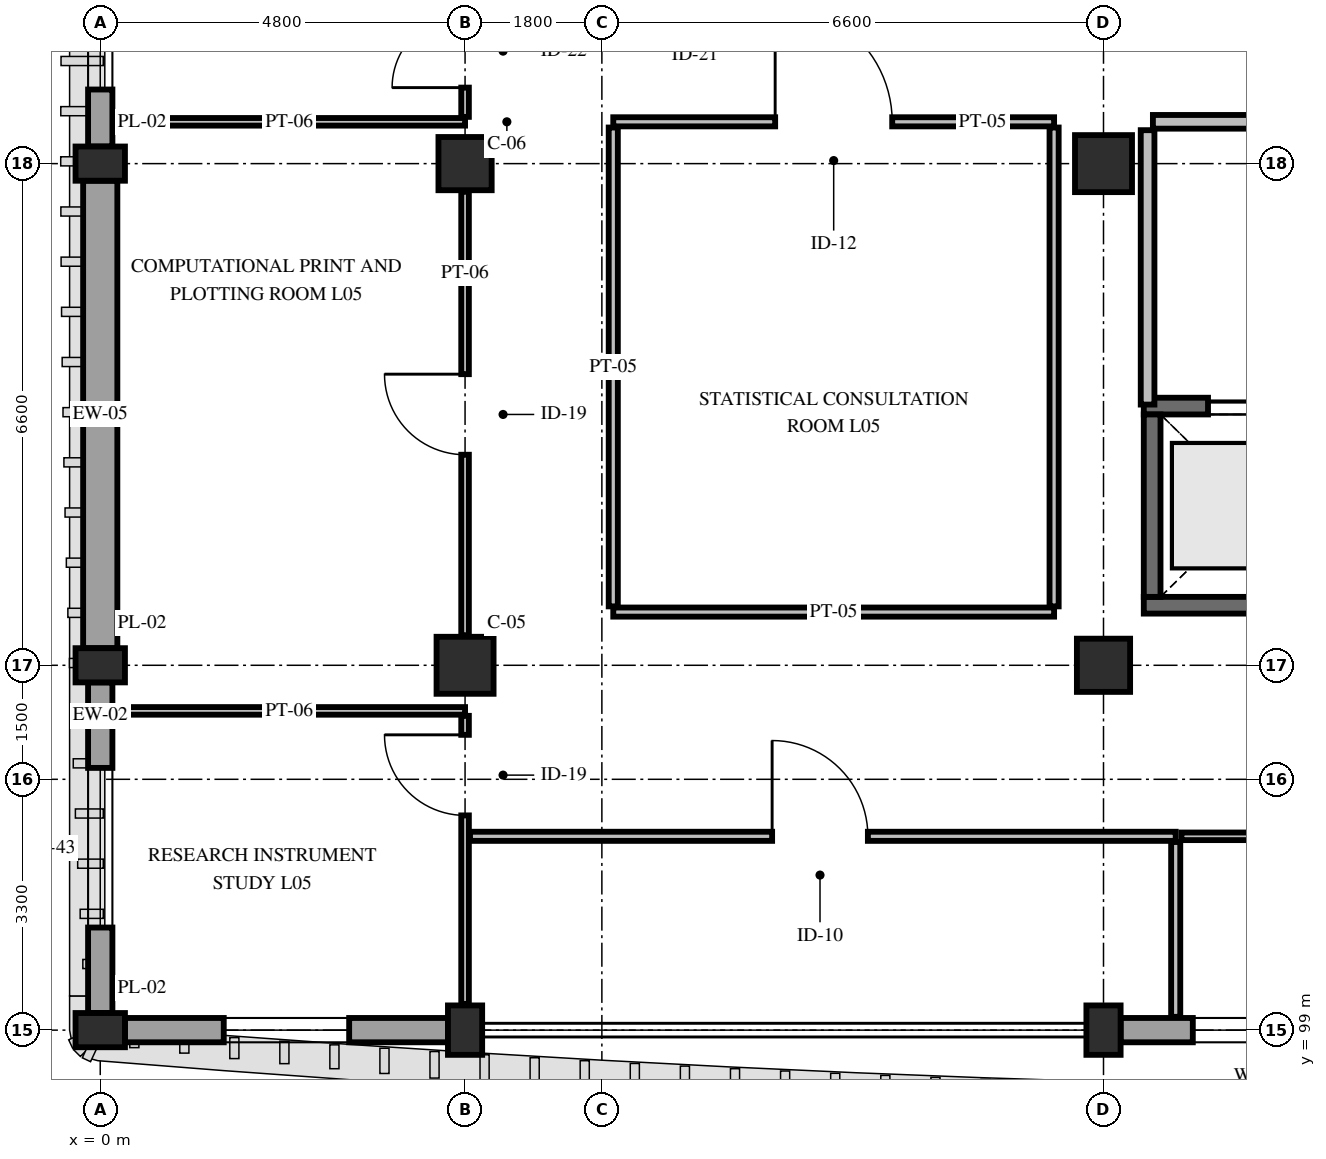
"""IFC4 building model, lengths in metres.
Left out: names, types, materials, properties, quantities, classifications, styles, units other than length and angle.
Written with IfcOpenShell. Run it as: python <this file> out.ifc"""

import sys

from ifc_helpers import new_model, si_unit, direction, frame, frame_2d, origin, origin_2d, place, context, subcontext, project, spatial, rectangle, extrude, element, fill, save


model = new_model("IFC4")
c1 = context("Model", 3, precision=1e-05, world=origin(), true_north=direction((0.0, 1.0)))
c2 = subcontext(c1, "Body", "Model", "MODEL_VIEW")
j1 = project(units=[si_unit("LENGTHUNIT", "METRE"), si_unit("PLANEANGLEUNIT", "RADIAN")], contexts=[c1])
p1 = place(None, origin())
s1 = spatial("IfcSite", under=j1, at=p1, CompositionType="ELEMENT")
p2 = place(p1, origin())
s2 = spatial("IfcBuilding", under=s1, at=p2, CompositionType="ELEMENT")
p3 = place(p2, frame((0.0, 0.0, 24.6)))
s3 = spatial("IfcBuildingStorey", under=s2, at=p3, CompositionType="ELEMENT", Elevation=24.6)
for number, where, z_axis, x_axis in (
    (1, (0.0, 99.0, 0.0), (0.0, 0.0, 1.0), (0.0, 1.0, 0.0)),
    (2, (0.0, 103.8, 0.0), (0.0, 0.0, 1.0), (0.0, 1.0, 0.0)),
    (3, (0.0, 110.4, 0.0), (0.0, 0.0, 1.0), (0.0, 1.0, 0.0)),
    (4, (4.8, 99.0, 0.0), (0.0, 0.0, 1.0), (1.0, 0.0, 0.0)),
):
    element("IfcColumn", number, at=place(p3, frame(where, z_axis=z_axis, x_axis=x_axis)), inside=s3, PredefinedType="PILASTER", context=c2, shape_type="SweptSolid", body=[
        extrude(rectangle(XDim=0.45, YDim=0.65, at=origin_2d()), origin(), (0.0, 0.0, 1.0), 4.8),
    ])
p4 = place(p3, frame((4.8, 103.8, 0.0), z_axis=(0.0, 0.0, 1.0), x_axis=(1.0, 0.0, 0.0)))
e5 = element("IfcColumn", 5, at=p4, inside=s3, PredefinedType="COLUMN", context=c2, shape_type="SweptSolid", body=[
    extrude(rectangle(XDim=0.75, YDim=0.75, at=origin_2d()), origin(), (0.0, 0.0, 1.0), 4.8),
])
p5 = place(p3, frame((4.8, 110.4, 0.0), z_axis=(0.0, 0.0, 1.0), x_axis=(1.0, 0.0, 0.0)))
e6 = element("IfcColumn", 6, at=p5, inside=s3, PredefinedType="COLUMN", context=c2, shape_type="SweptSolid", body=[
    extrude(rectangle(XDim=0.7, YDim=0.7, at=origin_2d()), origin(), (0.0, 0.0, 1.0), 4.8),
])
p6 = place(p3, frame((13.2, 99.0, 0.0), z_axis=(0.0, 0.0, 1.0), x_axis=(1.0, 0.0, 0.0)))
e7 = element("IfcColumn", 7, at=p6, inside=s3, PredefinedType="PILASTER", context=c2, shape_type="SweptSolid", body=[
    extrude(rectangle(XDim=0.45, YDim=0.65, at=origin_2d()), origin(), (0.0, 0.0, 1.0), 4.8),
])
p7 = place(p3, frame((13.2, 103.8, 0.0), z_axis=(0.0, 0.0, 1.0), x_axis=(1.0, 0.0, 0.0)))
e8 = element("IfcColumn", 8, at=p7, inside=s3, PredefinedType="COLUMN", context=c2, shape_type="SweptSolid", body=[
    extrude(rectangle(XDim=0.7, YDim=0.7, at=origin_2d()), origin(), (0.0, 0.0, 1.0), 4.8),
])
p8 = place(p3, frame((13.2, 110.4, 0.0), z_axis=(0.0, 0.0, 1.0), x_axis=(1.0, 0.0, 0.0)))
e9 = element("IfcColumn", 9, at=p8, inside=s3, PredefinedType="COLUMN", context=c2, shape_type="SweptSolid", body=[
    extrude(rectangle(XDim=0.75, YDim=0.75, at=origin_2d()), origin(), (0.0, 0.0, 1.0), 4.8),
])
p9 = place(p3, frame((0.0, 99.225, 0.0), z_axis=(0.0, 0.0, 1.0), x_axis=(0.0, 1.0, 0.0)))
e10 = element("IfcWall", 10, at=p9, inside=s3, PredefinedType="STANDARD", context=c2, shape_type="SweptSolid", body=[
    extrude(rectangle(XDim=4.35, YDim=0.32, at=frame_2d((2.175, 0.0))), origin(), (0.0, 0.0, 1.0), 3.95),
])
p10 = place(p9, frame((1.125, 0.0, 0.85)))
e11 = element("IfcOpeningElement", 11, at=p10, cuts=e10, PredefinedType="OPENING", context=c2, shape_type="SweptSolid", body=[
    extrude(rectangle(XDim=2.1, YDim=2.08, at=frame_2d((1.05, 1.04))), frame((0.0, 0.175, 0.0), z_axis=(0.0, -1.0, 0.0), x_axis=(1.0, 0.0, 0.0)), (0.0, 0.0, 1.0), 0.35),
])
p11 = place(p3, frame((0.0, 104.025, 0.0), z_axis=(0.0, 0.0, 1.0), x_axis=(0.0, 1.0, 0.0)))
e12 = element("IfcWall", 12, at=p11, inside=s3, PredefinedType="SOLIDWALL", context=c2, shape_type="SweptSolid", body=[
    extrude(rectangle(XDim=6.15, YDim=0.45, at=frame_2d((3.075, 0.0))), origin(), (0.0, 0.0, 1.0), 3.95),
])
p12 = place(p3, frame((0.0, 110.625, 0.0), z_axis=(0.0, 0.0, 1.0), x_axis=(0.0, 1.0, 0.0)))
e13 = element("IfcWall", 13, at=p12, inside=s3, PredefinedType="STANDARD", context=c2, shape_type="SweptSolid", body=[
    extrude(rectangle(XDim=6.45, YDim=0.32, at=frame_2d((3.225, 0.0))), origin(), (0.0, 0.0, 1.0), 3.95),
])
p13 = place(p12, frame((0.75, 0.0, 0.85)))
e14 = element("IfcOpeningElement", 14, at=p13, cuts=e13, PredefinedType="OPENING", context=c2, shape_type="SweptSolid", body=[
    extrude(rectangle(XDim=2.1, YDim=2.08, at=frame_2d((1.05, 1.04))), frame((0.0, 0.175, 0.0), z_axis=(0.0, -1.0, 0.0), x_axis=(1.0, 0.0, 0.0)), (0.0, 0.0, 1.0), 0.35),
])
p14 = place(p12, frame((3.6, 0.0, 0.85)))
e15 = element("IfcOpeningElement", 15, at=p14, cuts=e13, PredefinedType="OPENING", context=c2, shape_type="SweptSolid", body=[
    extrude(rectangle(XDim=2.1, YDim=2.08, at=frame_2d((1.05, 1.04))), frame((0.0, 0.175, 0.0), z_axis=(0.0, -1.0, 0.0), x_axis=(1.0, 0.0, 0.0)), (0.0, 0.0, 1.0), 0.35),
])
p15 = place(p3, frame((19.575, 99.0, 0.0), z_axis=(0.0, 0.0, 1.0), x_axis=(-1.0, 0.0, 0.0)))
e16 = element("IfcWall", 16, at=p15, inside=s3, PredefinedType="STANDARD", context=c2, shape_type="SweptSolid", body=[
    extrude(rectangle(XDim=6.15, YDim=0.32, at=frame_2d((3.075, 0.0))), origin(), (0.0, 0.0, 1.0), 3.93),
])
p16 = place(p15, frame((0.95, 0.0, 0.85)))
e17 = element("IfcOpeningElement", 17, at=p16, cuts=e16, PredefinedType="OPENING", context=c2, shape_type="SweptSolid", body=[
    extrude(rectangle(XDim=1.65, YDim=1.66, at=frame_2d((0.825, 0.83))), frame((0.0, 0.175, 0.0), z_axis=(0.0, -1.0, 0.0), x_axis=(1.0, 0.0, 0.0)), (0.0, 0.0, 1.0), 0.35),
])
p17 = place(p15, frame((3.55, 0.0, 0.85)))
e18 = element("IfcOpeningElement", 18, at=p17, cuts=e16, PredefinedType="OPENING", context=c2, shape_type="SweptSolid", body=[
    extrude(rectangle(XDim=1.65, YDim=1.66, at=frame_2d((0.825, 0.83))), frame((0.0, 0.175, 0.0), z_axis=(0.0, -1.0, 0.0), x_axis=(1.0, 0.0, 0.0)), (0.0, 0.0, 1.0), 0.35),
])
p18 = place(p3, frame((4.575, 99.0, 0.0), z_axis=(0.0, 0.0, 1.0), x_axis=(-1.0, 0.0, 0.0)))
e19 = element("IfcWall", 19, at=p18, inside=s3, PredefinedType="STANDARD", context=c2, shape_type="SweptSolid", body=[
    extrude(rectangle(XDim=4.25, YDim=0.32, at=frame_2d((2.125, 0.0))), origin(), (0.0, 0.0, 1.0), 3.95),
])
p19 = place(p18, frame((1.3, 0.0, 0.85)))
e20 = element("IfcOpeningElement", 20, at=p19, cuts=e19, PredefinedType="OPENING", context=c2, shape_type="SweptSolid", body=[
    extrude(rectangle(XDim=1.65, YDim=1.66, at=frame_2d((0.825, 0.83))), frame((0.0, 0.175, 0.0), z_axis=(0.0, -1.0, 0.0), x_axis=(1.0, 0.0, 0.0)), (0.0, 0.0, 1.0), 0.35),
])
p20 = place(p3, frame((13.73, 104.59, 0.0), z_axis=(0.0, 0.0, 1.0), x_axis=(1.0, 0.0, 0.0)))
e21 = element("IfcWall", 21, at=p20, inside=s3, PredefinedType="SHEAR", context=c2, shape_type="SweptSolid", body=[
    extrude(rectangle(XDim=2.89, YDim=0.22, at=frame_2d((1.445, 0.0))), origin(), (0.0, 0.0, 1.0), 4.5),
])
p21 = place(p3, frame((13.73, 107.21, 0.0), z_axis=(0.0, 0.0, 1.0), x_axis=(1.0, 0.0, 0.0)))
e22 = element("IfcWall", 22, at=p21, inside=s3, PredefinedType="SHEAR", context=c2, shape_type="SweptSolid", body=[
    extrude(rectangle(XDim=2.89, YDim=0.22, at=frame_2d((1.445, 0.0))), origin(), (0.0, 0.0, 1.0), 4.5),
])
p22 = place(p21, frame((0.845, 0.0, 0.0)))
e23 = element("IfcOpeningElement", 23, at=p22, cuts=e22, PredefinedType="OPENING", context=c2, shape_type="SweptSolid", body=[
    extrude(rectangle(XDim=1.2, YDim=2.2, at=frame_2d((0.6, 1.1))), frame((0.0, 0.125, 0.0), z_axis=(0.0, -1.0, 0.0), x_axis=(1.0, 0.0, 0.0)), (0.0, 0.0, 1.0), 0.25),
])
p23 = place(p3, frame((13.84, 104.7, 0.0), z_axis=(0.0, 0.0, 1.0), x_axis=(0.0, 1.0, 0.0)))
e24 = element("IfcWall", 24, at=p23, inside=s3, PredefinedType="SHEAR", context=c2, shape_type="SweptSolid", body=[
    extrude(rectangle(XDim=2.4, YDim=0.22, at=frame_2d((1.2, 0.0))), origin(), (0.0, 0.0, 1.0), 4.5),
])
p24 = place(p3, frame((13.85, 110.95, 0.0), z_axis=(0.0, 0.0, 1.0), x_axis=(1.0, 0.0, 0.0)))
e25 = element("IfcWall", 25, at=p24, inside=s3, PredefinedType="PARTITIONING", context=c2, shape_type="SweptSolid", body=[
    extrude(rectangle(XDim=5.47, YDim=0.18, at=frame_2d((2.735, 0.0))), origin(), (0.0, 0.0, 1.0), 4.345),
])
p25 = place(p24, frame((1.85, 0.0, 0.0)))
e26 = element("IfcOpeningElement", 26, at=p25, cuts=e25, PredefinedType="OPENING", context=c2, shape_type="SweptSolid", body=[
    extrude(rectangle(XDim=1.6, YDim=2.25, at=frame_2d((0.8, 1.125))), frame((0.0, 0.105, 0.0), z_axis=(0.0, -1.0, 0.0), x_axis=(1.0, 0.0, 0.0)), (0.0, 0.0, 1.0), 0.21),
])
p26 = place(p3, frame((13.78, 107.23, 0.0), z_axis=(0.0, 0.0, 1.0), x_axis=(0.0, 1.0, 0.0)))
e27 = element("IfcWall", 27, at=p26, inside=s3, PredefinedType="PARTITIONING", context=c2, shape_type="SweptSolid", body=[
    extrude(rectangle(XDim=3.61, YDim=0.18, at=frame_2d((1.805, 0.0))), origin(), (0.0, 0.0, 1.0), 4.18),
])
p27 = place(p3, frame((6.75, 104.5, 0.0), z_axis=(0.0, 0.0, 1.0), x_axis=(1.0, 0.0, 0.0)))
e28 = element("IfcWall", 28, at=p27, inside=s3, PredefinedType="PARTITIONING", context=c2, shape_type="SweptSolid", body=[
    extrude(rectangle(XDim=5.8, YDim=0.12, at=frame_2d((2.9, 0.0))), origin(), (0.0, 0.0, 1.0), 4.345),
])
p28 = place(p3, frame((6.75, 110.95, 0.0), z_axis=(0.0, 0.0, 1.0), x_axis=(1.0, 0.0, 0.0)))
e29 = element("IfcWall", 29, at=p28, inside=s3, PredefinedType="PARTITIONING", context=c2, shape_type="SweptSolid", body=[
    extrude(rectangle(XDim=5.8, YDim=0.12, at=frame_2d((2.9, 0.0))), origin(), (0.0, 0.0, 1.0), 4.345),
])
p29 = place(p28, frame((2.13, 0.0, 0.0)))
e30 = element("IfcOpeningElement", 30, at=p29, cuts=e29, PredefinedType="OPENING", context=c2, shape_type="SweptSolid", body=[
    extrude(rectangle(XDim=1.54, YDim=2.25, at=frame_2d((0.77, 1.125))), frame((0.0, 0.075, 0.0), z_axis=(0.0, -1.0, 0.0), x_axis=(1.0, 0.0, 0.0)), (0.0, 0.0, 1.0), 0.15),
])
for number, where, z_axis, x_axis in (
    (31, (6.75, 104.575, 0.0), (0.0, 0.0, 1.0), (0.0, 1.0, 0.0)),
    (32, (12.55, 104.575, 0.0), (0.0, 0.0, 1.0), (0.0, 1.0, 0.0)),
):
    element("IfcWall", number, at=place(p3, frame(where, z_axis=z_axis, x_axis=x_axis)), inside=s3, PredefinedType="PARTITIONING", context=c2, shape_type="SweptSolid", body=[
        extrude(rectangle(XDim=6.3, YDim=0.12, at=frame_2d((3.15, 0.0))), origin(), (0.0, 0.0, 1.0), 3.83),
    ])
for number, where, z_axis, x_axis in (
    (33, (0.175, 103.2, 0.0), (0.0, 0.0, 1.0), (1.0, 0.0, 0.0)),
    (34, (0.175, 110.95, 0.0), (0.0, 0.0, 1.0), (1.0, 0.0, 0.0)),
):
    element("IfcWall", number, at=place(p3, frame(where, z_axis=z_axis, x_axis=x_axis)), inside=s3, PredefinedType="PARTITIONING", context=c2, shape_type="SweptSolid", body=[
        extrude(rectangle(XDim=4.625, YDim=0.1, at=frame_2d((2.312, 0.0))), origin(), (0.0, 0.0, 1.0), 4.08),
    ])
p30 = place(p3, frame((4.8, 104.195, 0.0), z_axis=(0.0, 0.0, 1.0), x_axis=(0.0, 1.0, 0.0)))
e35 = element("IfcWall", 35, at=p30, inside=s3, PredefinedType="PARTITIONING", context=c2, shape_type="SweptSolid", body=[
    extrude(rectangle(XDim=5.835, YDim=0.1, at=frame_2d((2.917, 0.0))), origin(), (0.0, 0.0, 1.0), 4.13),
])
p31 = place(p30, frame((2.375, 0.0, 0.0)))
e36 = element("IfcOpeningElement", 36, at=p31, cuts=e35, PredefinedType="OPENING", context=c2, shape_type="SweptSolid", body=[
    extrude(rectangle(XDim=1.06, YDim=2.2, at=frame_2d((0.53, 1.1))), frame((0.0, 0.065, 0.0), z_axis=(0.0, -1.0, 0.0), x_axis=(1.0, 0.0, 0.0)), (0.0, 0.0, 1.0), 0.13),
])
p32 = place(p3, frame((4.8, 111.015, 0.0), z_axis=(0.0, 0.0, 1.0), x_axis=(0.0, 1.0, 0.0)))
e37 = element("IfcWall", 37, at=p32, inside=s3, PredefinedType="PARTITIONING", context=c2, shape_type="SweptSolid", body=[
    extrude(rectangle(XDim=5.89, YDim=0.1, at=frame_2d((2.945, 0.0))), origin(), (0.0, 0.0, 1.0), 4.13),
])
p33 = place(p32, frame((0.385, 0.0, 0.0)))
e38 = element("IfcOpeningElement", 38, at=p33, cuts=e37, PredefinedType="OPENING", context=c2, shape_type="SweptSolid", body=[
    extrude(rectangle(XDim=0.96, YDim=2.15, at=frame_2d((0.48, 1.075))), frame((0.0, 0.065, 0.0), z_axis=(0.0, -1.0, 0.0), x_axis=(1.0, 0.0, 0.0)), (0.0, 0.0, 1.0), 0.13),
])
p34 = place(p3, frame((4.8, 99.345, 0.0), z_axis=(0.0, 0.0, 1.0), x_axis=(0.0, 1.0, 0.0)))
e39 = element("IfcWall", 39, at=p34, inside=s3, PredefinedType="PARTITIONING", context=c2, shape_type="SweptSolid", body=[
    extrude(rectangle(XDim=3.79, YDim=0.1, at=frame_2d((1.895, 0.0))), origin(), (0.0, 0.0, 1.0), 4.13),
])
p35 = place(p34, frame((2.48, 0.0, 0.0)))
e40 = element("IfcOpeningElement", 40, at=p35, cuts=e39, PredefinedType="OPENING", context=c2, shape_type="SweptSolid", body=[
    extrude(rectangle(XDim=1.06, YDim=2.2, at=frame_2d((0.53, 1.1))), frame((0.0, 0.065, 0.0), z_axis=(0.0, -1.0, 0.0), x_axis=(1.0, 0.0, 0.0)), (0.0, 0.0, 1.0), 0.13),
])
p36 = place(p3, frame((4.865, 101.55, 0.0), z_axis=(0.0, 0.0, 1.0), x_axis=(1.0, 0.0, 0.0)))
e41 = element("IfcWall", 41, at=p36, inside=s3, PredefinedType="PARTITIONING", context=c2, shape_type="SweptSolid", body=[
    extrude(rectangle(XDim=9.285, YDim=0.12, at=frame_2d((4.643, 0.0))), origin(), (0.0, 0.0, 1.0), 4.13),
])
p37 = place(p36, frame((3.975, 0.0, 0.0)))
e42 = element("IfcOpeningElement", 42, at=p37, cuts=e41, PredefinedType="OPENING", context=c2, shape_type="SweptSolid", body=[
    extrude(rectangle(XDim=1.26, YDim=2.2, at=frame_2d((0.63, 1.1))), frame((0.0, 0.075, 0.0), z_axis=(0.0, -1.0, 0.0), x_axis=(1.0, 0.0, 0.0)), (0.0, 0.0, 1.0), 0.15),
])
p38 = place(p3, frame((14.15, 99.175, 0.0), z_axis=(0.0, 0.0, 1.0), x_axis=(0.0, 1.0, 0.0)))
e43 = element("IfcWall", 43, at=p38, inside=s3, PredefinedType="PARTITIONING", context=c2, shape_type="SweptSolid", body=[
    extrude(rectangle(XDim=2.3, YDim=0.12, at=frame_2d((1.15, 0.0))), origin(), (0.0, 0.0, 1.0), 3.93),
])
p39 = place(p3, frame((14.225, 101.55, 0.0), z_axis=(0.0, 0.0, 1.0), x_axis=(1.0, 0.0, 0.0)))
e44 = element("IfcWall", 44, at=p39, inside=s3, PredefinedType="PARTITIONING", context=c2, shape_type="SweptSolid", body=[
    extrude(rectangle(XDim=13.375, YDim=0.1, at=frame_2d((6.688, 0.0))), origin(), (0.0, 0.0, 1.0), 4.13),
])
p40 = place(p39, frame((6.595, 0.0, 0.0)))
e45 = element("IfcOpeningElement", 45, at=p40, cuts=e44, PredefinedType="OPENING", context=c2, shape_type="SweptSolid", body=[
    extrude(rectangle(XDim=1.06, YDim=2.2, at=frame_2d((0.53, 1.1))), frame((0.0, 0.065, 0.0), z_axis=(0.0, -1.0, 0.0), x_axis=(1.0, 0.0, 0.0)), (0.0, 0.0, 1.0), 0.13),
])
p41 = place(p10, origin())
e46 = element("IfcWindow", 46, at=p41, inside=s3, PartitioningType="DOUBLE_PANEL_VERTICAL", PredefinedType="WINDOW", context=c2, shape_type="SweptSolid", body=[
    extrude(rectangle(XDim=2.1, YDim=2.08, at=frame_2d((1.05, 1.04))), frame((0.0, 0.03, 0.0), z_axis=(0.0, -1.0, 0.0), x_axis=(1.0, 0.0, 0.0)), (0.0, 0.0, 1.0), 0.06),
])
fill(e11, e46)
p42 = place(p13, origin())
e47 = element("IfcWindow", 47, at=p42, inside=s3, PartitioningType="DOUBLE_PANEL_VERTICAL", PredefinedType="WINDOW", context=c2, shape_type="SweptSolid", body=[
    extrude(rectangle(XDim=2.1, YDim=2.08, at=frame_2d((1.05, 1.04))), frame((0.0, 0.03, 0.0), z_axis=(0.0, -1.0, 0.0), x_axis=(1.0, 0.0, 0.0)), (0.0, 0.0, 1.0), 0.06),
])
fill(e14, e47)
p43 = place(p17, origin())
e48 = element("IfcWindow", 48, at=p43, inside=s3, PartitioningType="SINGLE_PANEL", PredefinedType="WINDOW", context=c2, shape_type="SweptSolid", body=[
    extrude(rectangle(XDim=1.65, YDim=1.66, at=frame_2d((0.825, 0.83))), frame((0.0, 0.03, 0.0), z_axis=(0.0, -1.0, 0.0), x_axis=(1.0, 0.0, 0.0)), (0.0, 0.0, 1.0), 0.06),
])
fill(e18, e48)
p44 = place(p19, origin())
e49 = element("IfcWindow", 49, at=p44, inside=s3, PartitioningType="SINGLE_PANEL", PredefinedType="WINDOW", context=c2, shape_type="SweptSolid", body=[
    extrude(rectangle(XDim=1.65, YDim=1.66, at=frame_2d((0.825, 0.83))), frame((0.0, 0.03, 0.0), z_axis=(0.0, -1.0, 0.0), x_axis=(1.0, 0.0, 0.0)), (0.0, 0.0, 1.0), 0.06),
])
fill(e20, e49)
p45 = place(p22, origin())
e50 = element("IfcDoor", 50, at=p45, inside=s3, OperationType="DOUBLE_DOOR_SLIDING", PredefinedType="DOOR", context=c2, shape_type="SweptSolid", body=[
    extrude(rectangle(XDim=1.2, YDim=2.2, at=frame_2d((0.6, 1.1))), frame((0.0, 0.025, 0.0), z_axis=(0.0, -1.0, 0.0), x_axis=(1.0, 0.0, 0.0)), (0.0, 0.0, 1.0), 0.05),
])
fill(e23, e50)
p46 = place(p29, origin())
e51 = element("IfcDoor", 51, at=p46, inside=s3, OperationType="SINGLE_SWING_LEFT", PredefinedType="DOOR", context=c2, shape_type="SweptSolid", body=[
    extrude(rectangle(XDim=1.54, YDim=2.25, at=frame_2d((0.77, 1.125))), frame((0.0, 0.025, 0.0), z_axis=(0.0, -1.0, 0.0), x_axis=(1.0, 0.0, 0.0)), (0.0, 0.0, 1.0), 0.05),
])
fill(e30, e51)
p47 = place(p31, origin())
e52 = element("IfcDoor", 52, at=p47, inside=s3, OperationType="SINGLE_SWING_RIGHT", PredefinedType="DOOR", context=c2, shape_type="SweptSolid", body=[
    extrude(rectangle(XDim=1.06, YDim=2.2, at=frame_2d((0.53, 1.1))), frame((0.0, 0.025, 0.0), z_axis=(0.0, -1.0, 0.0), x_axis=(1.0, 0.0, 0.0)), (0.0, 0.0, 1.0), 0.05),
])
fill(e36, e52)
p48 = place(p33, origin())
e53 = element("IfcDoor", 53, at=p48, inside=s3, OperationType="SINGLE_SWING_LEFT", PredefinedType="DOOR", context=c2, shape_type="SweptSolid", body=[
    extrude(rectangle(XDim=0.96, YDim=2.15, at=frame_2d((0.48, 1.075))), frame((0.0, 0.025, 0.0), z_axis=(0.0, -1.0, 0.0), x_axis=(1.0, 0.0, 0.0)), (0.0, 0.0, 1.0), 0.05),
])
fill(e38, e53)
p49 = place(p35, origin())
e54 = element("IfcDoor", 54, at=p49, inside=s3, OperationType="SINGLE_SWING_RIGHT", PredefinedType="DOOR", context=c2, shape_type="SweptSolid", body=[
    extrude(rectangle(XDim=1.06, YDim=2.2, at=frame_2d((0.53, 1.1))), frame((0.0, 0.025, 0.0), z_axis=(0.0, -1.0, 0.0), x_axis=(1.0, 0.0, 0.0)), (0.0, 0.0, 1.0), 0.05),
])
fill(e40, e54)
p50 = place(p37, origin())
e55 = element("IfcDoor", 55, at=p50, inside=s3, OperationType="SINGLE_SWING_LEFT", PredefinedType="DOOR", context=c2, shape_type="SweptSolid", body=[
    extrude(rectangle(XDim=1.26, YDim=2.2, at=frame_2d((0.63, 1.1))), frame((0.0, 0.025, 0.0), z_axis=(0.0, -1.0, 0.0), x_axis=(1.0, 0.0, 0.0)), (0.0, 0.0, 1.0), 0.05),
])
fill(e42, e55)
save(model, sys.argv[1])
